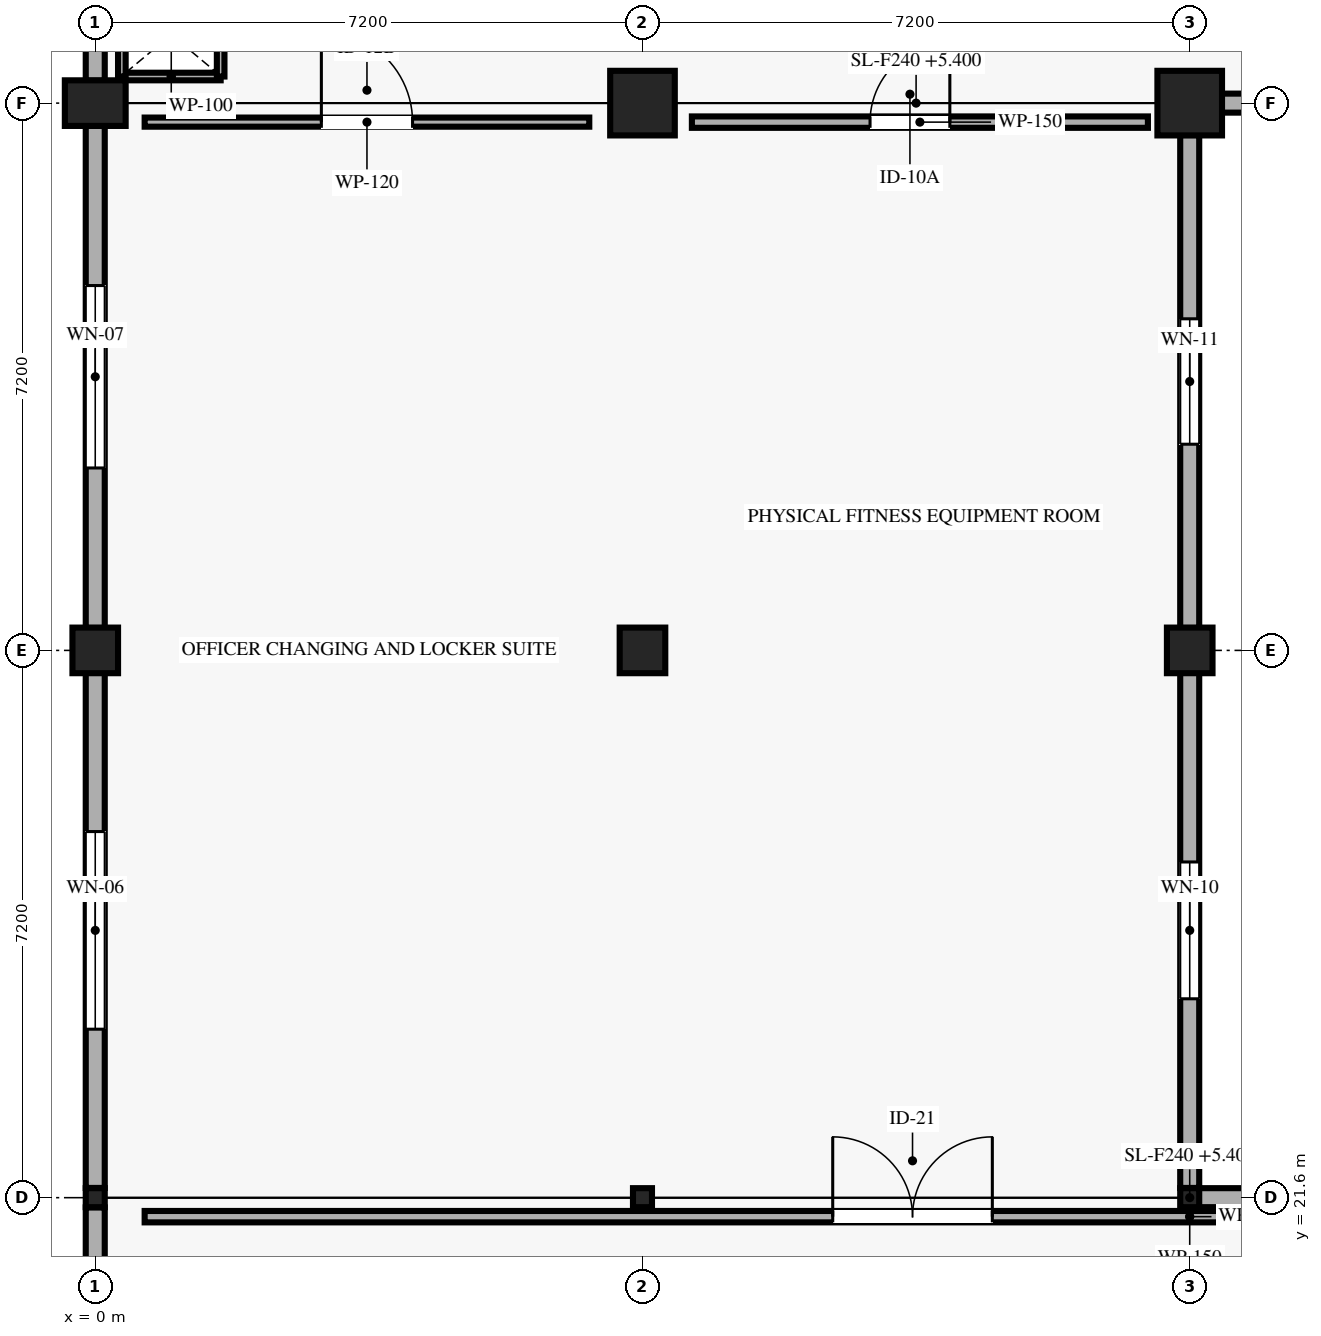
"""IFC4 building model, lengths in metres.
Left out: names, types, materials, properties, quantities, classifications, styles, units other than length and angle.
Written with IfcOpenShell. Run it as: python <this file> out.ifc"""

import sys

from ifc_helpers import new_model, si_unit, direction, frame, frame_2d, origin, origin_2d, place, context, subcontext, project, spatial, rectangle, i_section, extrude, element, fill, save


model = new_model("IFC4")
c1 = context("Model", 3, precision=1e-05, world=origin(), true_north=direction((0.0, 1.0)))
c2 = subcontext(c1, "Body", "Model", "MODEL_VIEW")
j1 = project(units=[si_unit("LENGTHUNIT", "METRE"), si_unit("PLANEANGLEUNIT", "RADIAN")], contexts=[c1])
p1 = place(None, origin())
s1 = spatial("IfcSite", under=j1, at=p1, CompositionType="ELEMENT")
p2 = place(p1, origin())
s2 = spatial("IfcBuilding", under=s1, at=p2, CompositionType="ELEMENT")
p3 = place(p2, frame((0.0, 0.0, 5.4)))
s3 = spatial("IfcBuildingStorey", under=s2, at=p3, CompositionType="ELEMENT", Elevation=5.4)
p4 = place(p3, frame((0.0, 21.6, 0.0), z_axis=(0.0, 0.0, 1.0), x_axis=(1.0, 0.0, 0.0)))
e1 = element("IfcColumn", 1, at=p4, inside=s3, PredefinedType="COLUMN", context=c2, shape_type="SweptSolid", body=[
    extrude(i_section(OverallWidth=0.25, OverallDepth=0.25, WebThickness=0.009, FlangeThickness=0.01, at=origin_2d()), origin(), (0.0, 0.0, 1.0), 4.05),
])
p5 = place(p3, frame((0.0, 28.8, 0.0), z_axis=(0.0, 0.0, 1.0), x_axis=(1.0, 0.0, 0.0)))
e2 = element("IfcColumn", 2, at=p5, inside=s3, PredefinedType="COLUMN", context=c2, shape_type="SweptSolid", body=[
    extrude(rectangle(XDim=0.6, YDim=0.6, at=origin_2d()), origin(), (0.0, 0.0, 1.0), 4.05),
])
p6 = place(p3, frame((0.0, 36.0, 0.0), z_axis=(0.0, 0.0, 1.0), x_axis=(0.0, 1.0, 0.0)))
e3 = element("IfcColumn", 3, at=p6, inside=s3, PredefinedType="COLUMN", context=c2, shape_type="SweptSolid", body=[
    extrude(rectangle(XDim=0.6, YDim=0.8, at=origin_2d()), origin(), (0.0, 0.0, 1.0), 4.05),
])
p7 = place(p3, frame((7.2, 21.6, 0.0), z_axis=(0.0, 0.0, 1.0), x_axis=(1.0, 0.0, 0.0)))
e4 = element("IfcColumn", 4, at=p7, inside=s3, PredefinedType="COLUMN", context=c2, shape_type="SweptSolid", body=[
    extrude(i_section(OverallWidth=0.25, OverallDepth=0.25, WebThickness=0.009, FlangeThickness=0.01, at=origin_2d()), origin(), (0.0, 0.0, 1.0), 4.05),
])
p8 = place(p3, frame((7.2, 28.8, 0.0), z_axis=(0.0, 0.0, 1.0), x_axis=(1.0, 0.0, 0.0)))
e5 = element("IfcColumn", 5, at=p8, inside=s3, PredefinedType="COLUMN", context=c2, shape_type="SweptSolid", body=[
    extrude(rectangle(XDim=0.6, YDim=0.6, at=origin_2d()), origin(), (0.0, 0.0, 1.0), 4.05),
])
p9 = place(p3, frame((7.2, 36.0, 0.0), z_axis=(0.0, 0.0, 1.0), x_axis=(1.0, 0.0, 0.0)))
e6 = element("IfcColumn", 6, at=p9, inside=s3, PredefinedType="COLUMN", context=c2, shape_type="SweptSolid", body=[
    extrude(rectangle(XDim=0.85, YDim=0.85, at=origin_2d()), origin(), (0.0, 0.0, 1.0), 4.05),
])
p10 = place(p3, frame((14.4, 21.6, 0.0), z_axis=(0.0, 0.0, 1.0), x_axis=(1.0, 0.0, 0.0)))
e7 = element("IfcColumn", 7, at=p10, inside=s3, PredefinedType="COLUMN", context=c2, shape_type="SweptSolid", body=[
    extrude(i_section(OverallWidth=0.25, OverallDepth=0.25, WebThickness=0.009, FlangeThickness=0.01, at=origin_2d()), origin(), (0.0, 0.0, 1.0), 4.05),
])
p11 = place(p3, frame((14.4, 28.8, 0.0), z_axis=(0.0, 0.0, 1.0), x_axis=(1.0, 0.0, 0.0)))
e8 = element("IfcColumn", 8, at=p11, inside=s3, PredefinedType="COLUMN", context=c2, shape_type="SweptSolid", body=[
    extrude(rectangle(XDim=0.6, YDim=0.6, at=origin_2d()), origin(), (0.0, 0.0, 1.0), 4.05),
])
p12 = place(p3, frame((14.4, 36.0, 0.0), z_axis=(0.0, 0.0, 1.0), x_axis=(1.0, 0.0, 0.0)))
e9 = element("IfcColumn", 9, at=p12, inside=s3, PredefinedType="COLUMN", context=c2, shape_type="SweptSolid", body=[
    extrude(rectangle(XDim=0.85, YDim=0.85, at=origin_2d()), origin(), (0.0, 0.0, 1.0), 4.05),
])
p13 = place(p3, frame((14.41, 21.6, 0.0), z_axis=(0.0, 0.0, 1.0), x_axis=(1.0, 0.0, 0.0)))
e10 = element("IfcWall", 10, at=p13, inside=s3, PredefinedType="SOLIDWALL", context=c2, shape_type="SweptSolid", body=[
    extrude(rectangle(XDim=7.18, YDim=0.25, at=frame_2d((3.59, 0.0))), origin(), (0.0, 0.0, 1.0), 3.195),
])
p14 = place(p13, frame((2.69, 0.0, 0.85)))
e11 = element("IfcOpeningElement", 11, at=p14, cuts=e10, PredefinedType="OPENING", context=c2, shape_type="SweptSolid", body=[
    extrude(rectangle(XDim=1.8, YDim=1.6, at=frame_2d((0.9, 0.8))), frame((0.0, 0.135, 0.0), z_axis=(0.0, -1.0, 0.0), x_axis=(1.0, 0.0, 0.0)), (0.0, 0.0, 1.0), 0.27),
])
p15 = place(p3, frame((14.82, 36.0, 0.0), z_axis=(0.0, 0.0, 1.0), x_axis=(1.0, 0.0, 0.0)))
e12 = element("IfcWall", 12, at=p15, inside=s3, PredefinedType="SOLIDWALL", context=c2, shape_type="SweptSolid", body=[
    extrude(rectangle(XDim=6.36, YDim=0.25, at=frame_2d((3.18, 0.0))), origin(), (0.0, 0.0, 1.0), 3.195),
])
p16 = place(p15, frame((2.43, 0.0, 0.85)))
e13 = element("IfcOpeningElement", 13, at=p16, cuts=e12, PredefinedType="OPENING", context=c2, shape_type="SweptSolid", body=[
    extrude(rectangle(XDim=1.5, YDim=2.05, at=frame_2d((0.75, 1.025))), frame((0.0, 0.135, 0.0), z_axis=(0.0, -1.0, 0.0), x_axis=(1.0, 0.0, 0.0)), (0.0, 0.0, 1.0), 0.27),
])
p17 = place(p3, frame((0.0, 14.528, 0.0), z_axis=(0.0, 0.0, 1.0), x_axis=(0.0, 1.0, 0.0)))
e14 = element("IfcWall", 14, at=p17, inside=s3, PredefinedType="SOLIDWALL", context=c2, shape_type="SweptSolid", body=[
    extrude(rectangle(XDim=6.944, YDim=0.25, at=frame_2d((3.472, 0.0))), origin(), (0.0, 0.0, 1.0), 3.195),
])
p18 = place(p17, frame((2.072, 0.0, 0.85)))
e15 = element("IfcOpeningElement", 15, at=p18, cuts=e14, PredefinedType="OPENING", context=c2, shape_type="SweptSolid", body=[
    extrude(rectangle(XDim=2.8, YDim=1.85, at=frame_2d((1.4, 0.925))), frame((0.0, 0.135, 0.0), z_axis=(0.0, -1.0, 0.0), x_axis=(1.0, 0.0, 0.0)), (0.0, 0.0, 1.0), 0.27),
])
p19 = place(p3, frame((0.0, 21.728, 0.0), z_axis=(0.0, 0.0, 1.0), x_axis=(0.0, 1.0, 0.0)))
e16 = element("IfcWall", 16, at=p19, inside=s3, PredefinedType="SOLIDWALL", context=c2, shape_type="SweptSolid", body=[
    extrude(rectangle(XDim=6.777, YDim=0.25, at=frame_2d((3.388, 0.0))), origin(), (0.0, 0.0, 1.0), 3.195),
])
p20 = place(p19, frame((2.088, 0.0, 0.85)))
e17 = element("IfcOpeningElement", 17, at=p20, cuts=e16, PredefinedType="OPENING", context=c2, shape_type="SweptSolid", body=[
    extrude(rectangle(XDim=2.6, YDim=1.8, at=frame_2d((1.3, 0.9))), frame((0.0, 0.135, 0.0), z_axis=(0.0, -1.0, 0.0), x_axis=(1.0, 0.0, 0.0)), (0.0, 0.0, 1.0), 0.27),
])
p21 = place(p3, frame((0.0, 29.095, 0.0), z_axis=(0.0, 0.0, 1.0), x_axis=(0.0, 1.0, 0.0)))
e18 = element("IfcWall", 18, at=p21, inside=s3, PredefinedType="SOLIDWALL", context=c2, shape_type="SweptSolid", body=[
    extrude(rectangle(XDim=6.61, YDim=0.25, at=frame_2d((3.305, 0.0))), origin(), (0.0, 0.0, 1.0), 3.195),
])
p22 = place(p21, frame((2.105, 0.0, 0.85)))
e19 = element("IfcOpeningElement", 19, at=p22, cuts=e18, PredefinedType="OPENING", context=c2, shape_type="SweptSolid", body=[
    extrude(rectangle(XDim=2.4, YDim=1.75, at=frame_2d((1.2, 0.875))), frame((0.0, 0.135, 0.0), z_axis=(0.0, -1.0, 0.0), x_axis=(1.0, 0.0, 0.0)), (0.0, 0.0, 1.0), 0.27),
])
p23 = place(p3, frame((0.0, 36.295, 0.0), z_axis=(0.0, 0.0, 1.0), x_axis=(0.0, 1.0, 0.0)))
e20 = element("IfcWall", 20, at=p23, inside=s3, PredefinedType="SOLIDWALL", context=c2, shape_type="SweptSolid", body=[
    extrude(rectangle(XDim=3.085, YDim=0.25, at=frame_2d((1.542, 0.0))), origin(), (0.0, 0.0, 1.0), 3.195),
])
p24 = place(p23, frame((0.917, 0.0, 0.85)))
e21 = element("IfcOpeningElement", 21, at=p24, cuts=e20, PredefinedType="OPENING", context=c2, shape_type="SweptSolid", body=[
    extrude(rectangle(XDim=1.25, YDim=1.5, at=frame_2d((0.625, 0.75))), frame((0.0, 0.135, 0.0), z_axis=(0.0, -1.0, 0.0), x_axis=(1.0, 0.0, 0.0)), (0.0, 0.0, 1.0), 0.27),
])
p25 = place(p3, frame((14.4, 21.728, 0.0), z_axis=(0.0, 0.0, 1.0), x_axis=(0.0, 1.0, 0.0)))
e22 = element("IfcWall", 22, at=p25, inside=s3, PredefinedType="SOLIDWALL", context=c2, shape_type="SweptSolid", body=[
    extrude(rectangle(XDim=6.777, YDim=0.25, at=frame_2d((3.388, 0.0))), origin(), (0.0, 0.0, 1.0), 3.195),
])
p26 = place(p25, frame((2.489, 0.0, 0.85)))
e23 = element("IfcOpeningElement", 23, at=p26, cuts=e22, PredefinedType="OPENING", context=c2, shape_type="SweptSolid", body=[
    extrude(rectangle(XDim=1.8, YDim=1.6, at=frame_2d((0.9, 0.8))), frame((0.0, 0.135, 0.0), z_axis=(0.0, -1.0, 0.0), x_axis=(1.0, 0.0, 0.0)), (0.0, 0.0, 1.0), 0.27),
])
p27 = place(p3, frame((14.4, 29.095, 0.0), z_axis=(0.0, 0.0, 1.0), x_axis=(0.0, 1.0, 0.0)))
e24 = element("IfcWall", 24, at=p27, inside=s3, PredefinedType="SOLIDWALL", context=c2, shape_type="SweptSolid", body=[
    extrude(rectangle(XDim=6.485, YDim=0.25, at=frame_2d((3.243, 0.0))), origin(), (0.0, 0.0, 1.0), 3.195),
])
p28 = place(p27, frame((2.417, 0.0, 0.85)))
e25 = element("IfcOpeningElement", 25, at=p28, cuts=e24, PredefinedType="OPENING", context=c2, shape_type="SweptSolid", body=[
    extrude(rectangle(XDim=1.65, YDim=1.55, at=frame_2d((0.825, 0.775))), frame((0.0, 0.135, 0.0), z_axis=(0.0, -1.0, 0.0), x_axis=(1.0, 0.0, 0.0)), (0.0, 0.0, 1.0), 0.27),
])
p29 = place(p3, frame((0.35, 36.35, 0.0), z_axis=(0.0, 0.0, 1.0), x_axis=(1.0, 0.0, 0.0)))
e26 = element("IfcWall", 26, at=p29, inside=s3, PredefinedType="PARTITIONING", context=c2, shape_type="SweptSolid", body=[
    extrude(rectangle(XDim=1.3, YDim=0.1, at=frame_2d((0.65, 0.0))), origin(), (0.0, 0.0, 1.0), 3.2),
])
p30 = place(p3, frame((0.35, 36.35, 0.0), z_axis=(0.0, 0.0, 1.0), x_axis=(0.0, 1.0, 0.0)))
e27 = element("IfcWall", 27, at=p30, inside=s3, PredefinedType="PARTITIONING", context=c2, shape_type="SweptSolid", body=[
    extrude(rectangle(XDim=1.1, YDim=0.1, at=frame_2d((0.55, 0.0))), origin(), (0.0, 0.0, 1.0), 3.2),
])
p31 = place(p3, frame((1.65, 36.35, 0.0), z_axis=(0.0, 0.0, 1.0), x_axis=(0.0, 1.0, 0.0)))
e28 = element("IfcWall", 28, at=p31, inside=s3, PredefinedType="PARTITIONING", context=c2, shape_type="SweptSolid", body=[
    extrude(rectangle(XDim=1.1, YDim=0.1, at=frame_2d((0.55, 0.0))), origin(), (0.0, 0.0, 1.0), 3.81),
])
p32 = place(p3, frame((0.65, 21.35, 0.0), z_axis=(0.0, 0.0, 1.0), x_axis=(1.0, 0.0, 0.0)))
e29 = element("IfcWall", 29, at=p32, inside=s3, PredefinedType="PARTITIONING", context=c2, shape_type="SweptSolid", body=[
    extrude(rectangle(XDim=27.5, YDim=0.15, at=frame_2d((13.75, 0.0))), origin(), (0.0, 0.0, 1.0), 3.2),
])
p33 = place(p32, frame((9.053, 0.0, 0.0)))
e30 = element("IfcOpeningElement", 30, at=p33, cuts=e29, PredefinedType="OPENING", context=c2, shape_type="SweptSolid", body=[
    extrude(rectangle(XDim=2.1, YDim=2.4, at=frame_2d((1.05, 1.2))), frame((0.0, 0.085, 0.0), z_axis=(0.0, -1.0, 0.0), x_axis=(1.0, 0.0, 0.0)), (0.0, 0.0, 1.0), 0.17),
])
p34 = place(p3, frame((0.65, 35.75, 0.0), z_axis=(0.0, 0.0, 1.0), x_axis=(1.0, 0.0, 0.0)))
e31 = element("IfcWall", 31, at=p34, inside=s3, PredefinedType="PARTITIONING", context=c2, shape_type="SweptSolid", body=[
    extrude(rectangle(XDim=5.85, YDim=0.12, at=frame_2d((2.925, 0.0))), origin(), (0.0, 0.0, 1.0), 3.2),
])
p35 = place(p34, frame((2.325, 0.0, 0.0)))
e32 = element("IfcOpeningElement", 32, at=p35, cuts=e31, PredefinedType="OPENING", context=c2, shape_type="SweptSolid", body=[
    extrude(rectangle(XDim=1.2, YDim=2.15, at=frame_2d((0.6, 1.075))), frame((0.0, 0.07, 0.0), z_axis=(0.0, -1.0, 0.0), x_axis=(1.0, 0.0, 0.0)), (0.0, 0.0, 1.0), 0.14),
])
p36 = place(p3, frame((7.85, 35.75, 0.0), z_axis=(0.0, 0.0, 1.0), x_axis=(1.0, 0.0, 0.0)))
e33 = element("IfcWall", 33, at=p36, inside=s3, PredefinedType="PARTITIONING", context=c2, shape_type="SweptSolid", body=[
    extrude(rectangle(XDim=6.0, YDim=0.15, at=frame_2d((3.0, 0.0))), origin(), (0.0, 0.0, 1.0), 3.2),
])
p37 = place(p36, frame((2.344, 0.0, 0.0)))
e34 = element("IfcOpeningElement", 34, at=p37, cuts=e33, PredefinedType="OPENING", context=c2, shape_type="SweptSolid", body=[
    extrude(rectangle(XDim=1.05, YDim=2.15, at=frame_2d((0.525, 1.075))), frame((0.0, 0.085, 0.0), z_axis=(0.0, -1.0, 0.0), x_axis=(1.0, 0.0, 0.0)), (0.0, 0.0, 1.0), 0.17),
])
p38 = place(p20, origin())
e35 = element("IfcWindow", 35, at=p38, inside=s3, PartitioningType="SINGLE_PANEL", PredefinedType="WINDOW", context=c2, shape_type="SweptSolid", body=[
    extrude(rectangle(XDim=2.6, YDim=1.8, at=frame_2d((1.3, 0.9))), frame((0.0, 0.03, 0.0), z_axis=(0.0, -1.0, 0.0), x_axis=(1.0, 0.0, 0.0)), (0.0, 0.0, 1.0), 0.06),
])
fill(e17, e35)
p39 = place(p22, origin())
e36 = element("IfcWindow", 36, at=p39, inside=s3, PartitioningType="SINGLE_PANEL", PredefinedType="WINDOW", context=c2, shape_type="SweptSolid", body=[
    extrude(rectangle(XDim=2.4, YDim=1.75, at=frame_2d((1.2, 0.875))), frame((0.0, 0.03, 0.0), z_axis=(0.0, -1.0, 0.0), x_axis=(1.0, 0.0, 0.0)), (0.0, 0.0, 1.0), 0.06),
])
fill(e19, e36)
p40 = place(p26, origin())
e37 = element("IfcWindow", 37, at=p40, inside=s3, PartitioningType="SINGLE_PANEL", PredefinedType="WINDOW", context=c2, shape_type="SweptSolid", body=[
    extrude(rectangle(XDim=1.8, YDim=1.6, at=frame_2d((0.9, 0.8))), frame((0.0, 0.03, 0.0), z_axis=(0.0, -1.0, 0.0), x_axis=(1.0, 0.0, 0.0)), (0.0, 0.0, 1.0), 0.06),
])
fill(e23, e37)
p41 = place(p28, origin())
e38 = element("IfcWindow", 38, at=p41, inside=s3, PartitioningType="SINGLE_PANEL", PredefinedType="WINDOW", context=c2, shape_type="SweptSolid", body=[
    extrude(rectangle(XDim=1.65, YDim=1.55, at=frame_2d((0.825, 0.775))), frame((0.0, 0.03, 0.0), z_axis=(0.0, -1.0, 0.0), x_axis=(1.0, 0.0, 0.0)), (0.0, 0.0, 1.0), 0.06),
])
fill(e25, e38)
p42 = place(p33, origin())
e39 = element("IfcDoor", 39, at=p42, inside=s3, OperationType="DOUBLE_DOOR_SINGLE_SWING", PredefinedType="DOOR", context=c2, shape_type="SweptSolid", body=[
    extrude(rectangle(XDim=2.1, YDim=2.4, at=frame_2d((1.05, 1.2))), frame((0.0, 0.025, 0.0), z_axis=(0.0, -1.0, 0.0), x_axis=(1.0, 0.0, 0.0)), (0.0, 0.0, 1.0), 0.05),
])
fill(e30, e39)
p43 = place(p35, origin())
e40 = element("IfcDoor", 40, at=p43, inside=s3, OperationType="SINGLE_SWING_LEFT", PredefinedType="DOOR", context=c2, shape_type="SweptSolid", body=[
    extrude(rectangle(XDim=1.2, YDim=2.15, at=frame_2d((0.6, 1.075))), frame((0.0, 0.025, 0.0), z_axis=(0.0, -1.0, 0.0), x_axis=(1.0, 0.0, 0.0)), (0.0, 0.0, 1.0), 0.05),
])
fill(e32, e40)
p44 = place(p37, origin())
e41 = element("IfcDoor", 41, at=p44, inside=s3, OperationType="SINGLE_SWING_RIGHT", PredefinedType="DOOR", context=c2, shape_type="SweptSolid", body=[
    extrude(rectangle(XDim=1.05, YDim=2.15, at=frame_2d((0.525, 1.075))), frame((0.0, 0.025, 0.0), z_axis=(0.0, -1.0, 0.0), x_axis=(1.0, 0.0, 0.0)), (0.0, 0.0, 1.0), 0.05),
])
fill(e34, e41)
save(model, sys.argv[1])
